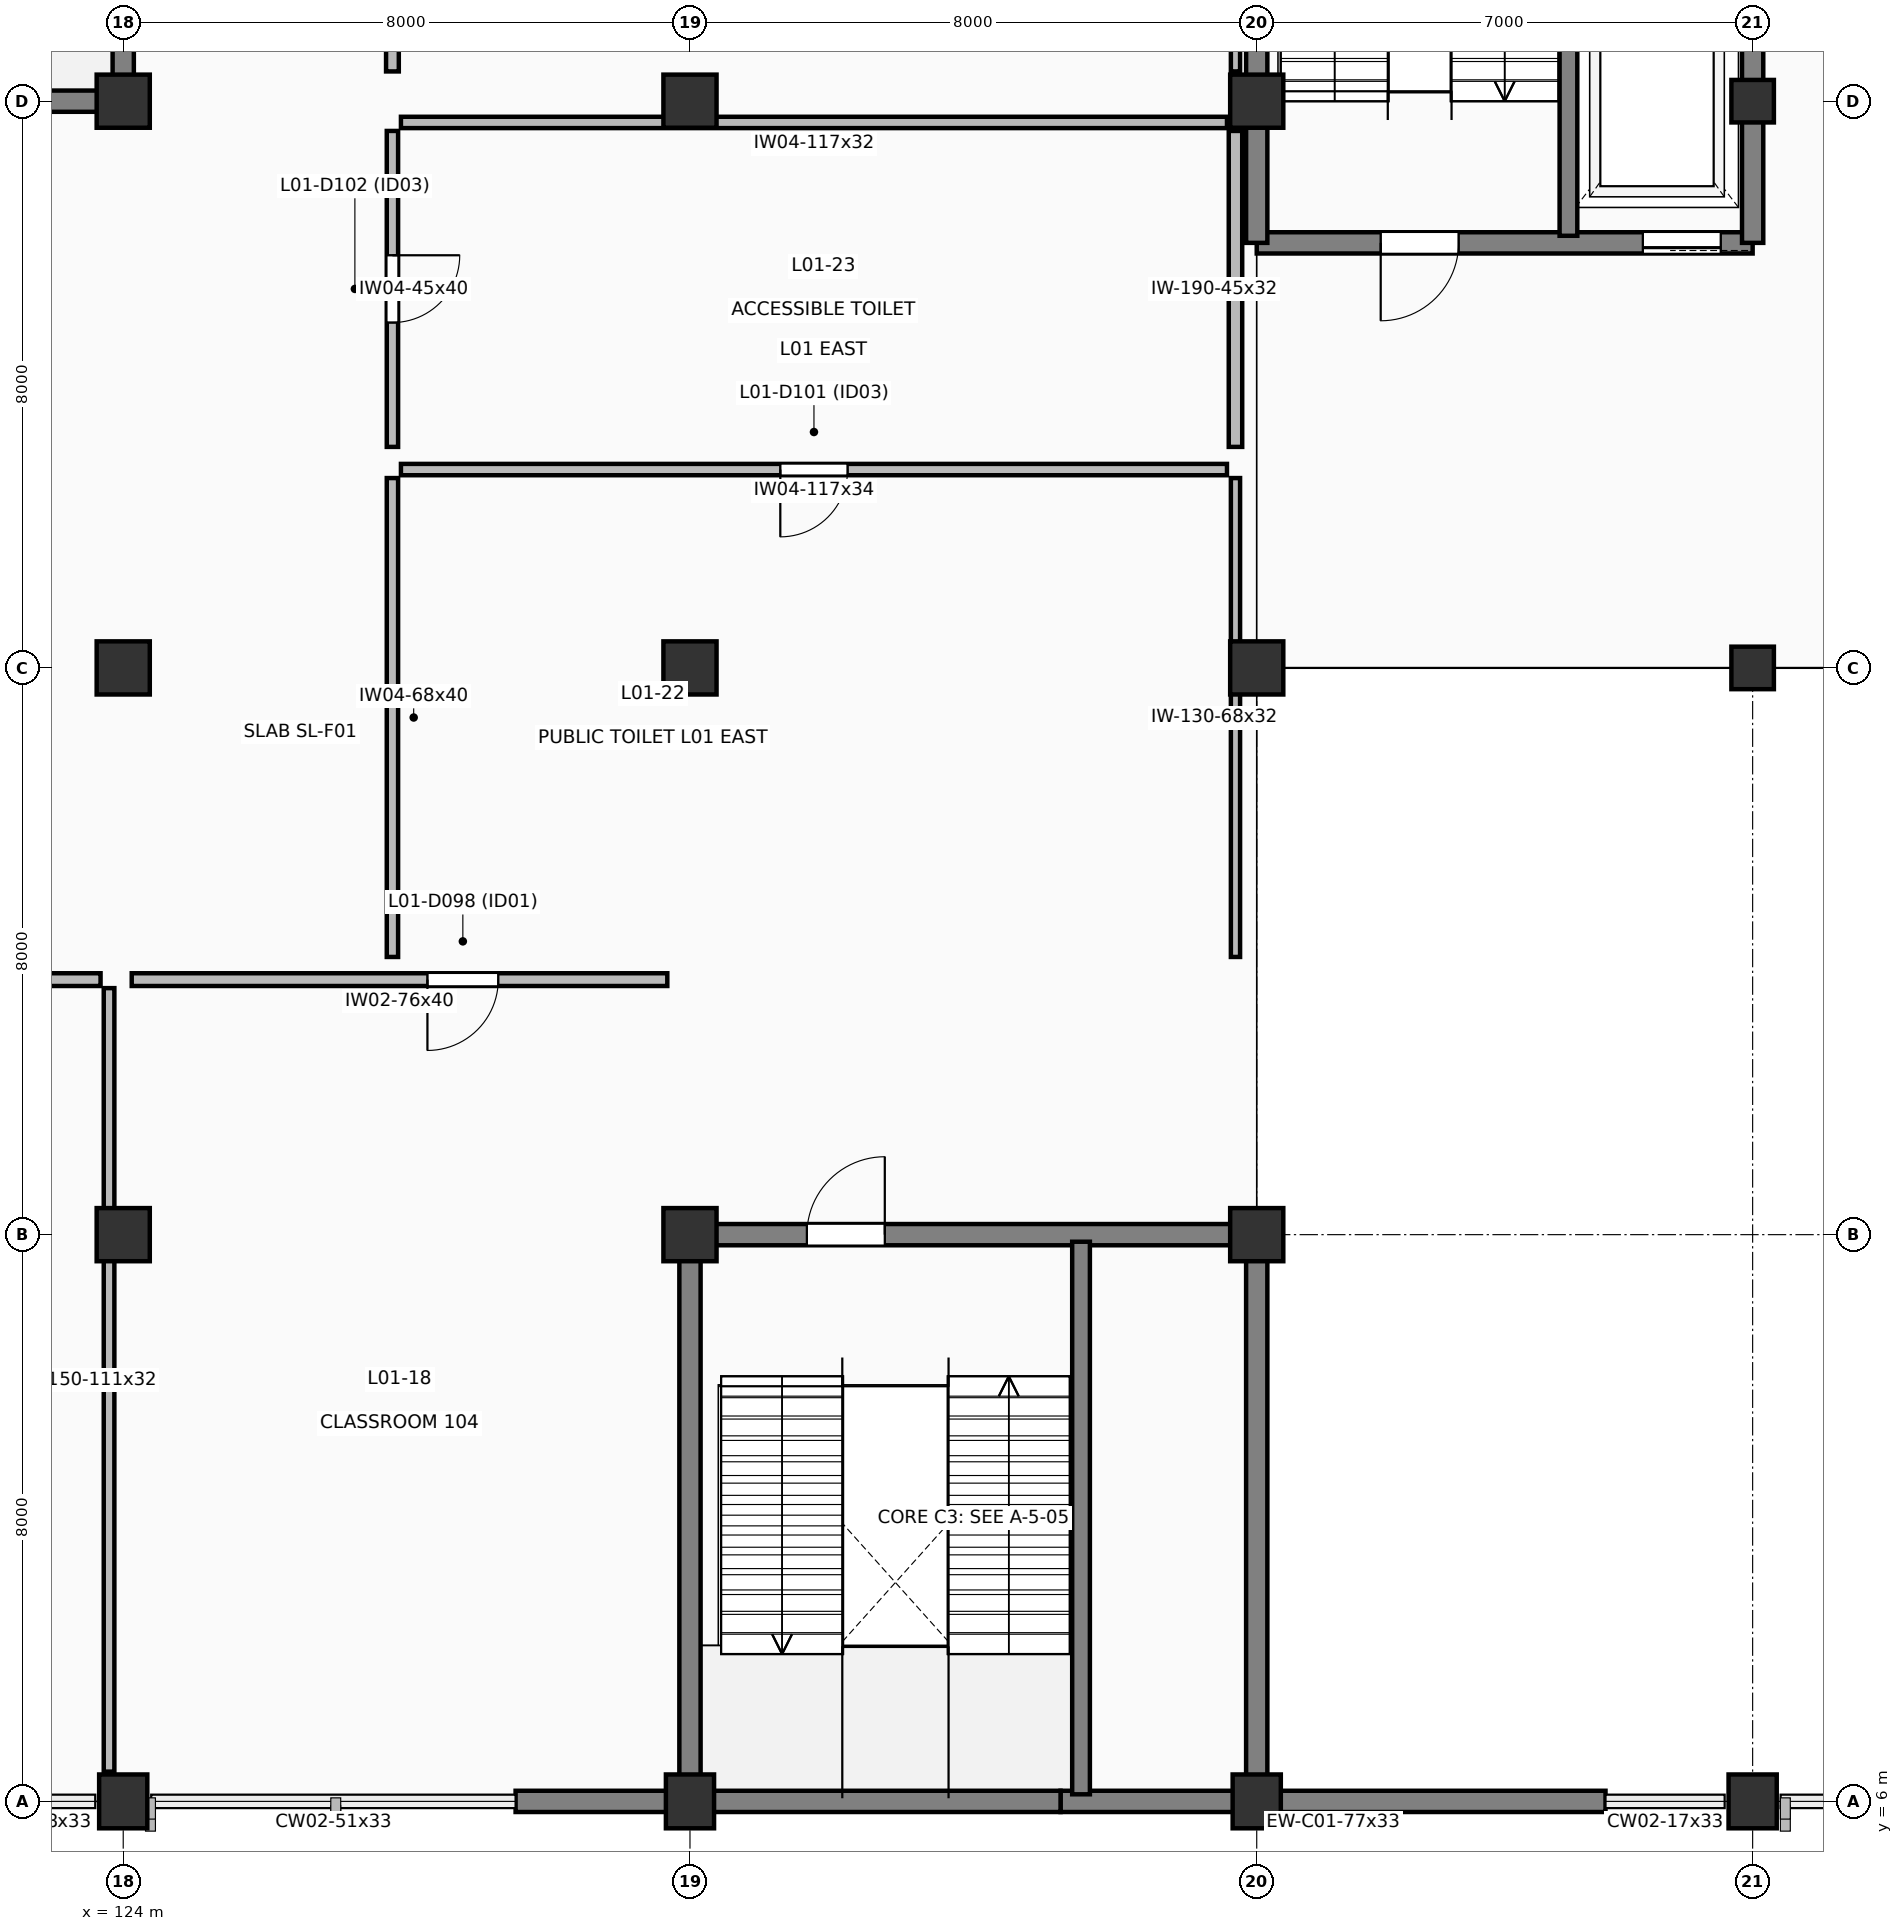
"""IFC4 building model, lengths in metres.
Left out: names, types, materials, properties, quantities, classifications, styles, units other than length and angle.
Written with IfcOpenShell. Run it as: python <this file> out.ifc"""

import sys

from ifc_helpers import new_model, si_unit, direction, frame, frame_2d, origin, origin_2d, place, context, subcontext, project, spatial, rectangle, extrude, element, fill, save


model = new_model("IFC4")
c1 = context("Model", 3, precision=1e-05, world=origin(), true_north=direction((0.0, 1.0)))
c2 = subcontext(c1, "Body", "Model", "MODEL_VIEW")
j1 = project(units=[si_unit("LENGTHUNIT", "METRE"), si_unit("PLANEANGLEUNIT", "RADIAN")], contexts=[c1])
p1 = place(None, origin())
s1 = spatial("IfcSite", under=j1, at=p1, CompositionType="ELEMENT")
p2 = place(p1, origin())
s2 = spatial("IfcBuilding", under=s1, at=p2, CompositionType="ELEMENT")
p3 = place(p2, frame((0.0, 0.0, 5.4)))
s3 = spatial("IfcBuildingStorey", under=s2, at=p3, CompositionType="ELEMENT", Elevation=5.4)
p4 = place(p3, frame((124.0, 6.0, 0.0), z_axis=(0.0, 0.0, 1.0), x_axis=(1.0, 0.0, 0.0)))
e1 = element("IfcColumn", 1, at=p4, inside=s3, PredefinedType="PILASTER", context=c2, shape_type="SweptSolid", body=[
    extrude(rectangle(XDim=0.68, YDim=0.76, at=origin_2d()), origin(), (0.0, 0.0, 1.0), 4.2),
])
for number, where, z_axis, x_axis in (
    (2, (124.0, 14.0, 0.0), (0.0, 0.0, 1.0), (1.0, 0.0, 0.0)),
    (3, (124.0, 22.0, 0.0), (0.0, 0.0, 1.0), (1.0, 0.0, 0.0)),
    (4, (124.0, 30.0, 0.0), (0.0, 0.0, 1.0), (1.0, 0.0, 0.0)),
):
    element("IfcColumn", number, at=place(p3, frame(where, z_axis=z_axis, x_axis=x_axis)), inside=s3, PredefinedType="COLUMN", context=c2, shape_type="SweptSolid", body=[
        extrude(rectangle(XDim=0.75, YDim=0.75, at=origin_2d()), origin(), (0.0, 0.0, 1.0), 4.2),
    ])
p5 = place(p3, frame((132.0, 6.0, 0.0), z_axis=(0.0, 0.0, 1.0), x_axis=(1.0, 0.0, 0.0)))
e5 = element("IfcColumn", 5, at=p5, inside=s3, PredefinedType="PILASTER", context=c2, shape_type="SweptSolid", body=[
    extrude(rectangle(XDim=0.68, YDim=0.76, at=origin_2d()), origin(), (0.0, 0.0, 1.0), 4.2),
])
for number, where, z_axis, x_axis in (
    (6, (132.0, 14.0, 0.0), (0.0, 0.0, 1.0), (1.0, 0.0, 0.0)),
    (7, (132.0, 22.0, 0.0), (0.0, 0.0, 1.0), (1.0, 0.0, 0.0)),
    (8, (132.0, 30.0, 0.0), (0.0, 0.0, 1.0), (1.0, 0.0, 0.0)),
):
    element("IfcColumn", number, at=place(p3, frame(where, z_axis=z_axis, x_axis=x_axis)), inside=s3, PredefinedType="COLUMN", context=c2, shape_type="SweptSolid", body=[
        extrude(rectangle(XDim=0.75, YDim=0.75, at=origin_2d()), origin(), (0.0, 0.0, 1.0), 4.2),
    ])
p6 = place(p3, frame((140.0, 6.0, 0.0), z_axis=(0.0, 0.0, 1.0), x_axis=(1.0, 0.0, 0.0)))
e9 = element("IfcColumn", 9, at=p6, inside=s3, PredefinedType="PILASTER", context=c2, shape_type="SweptSolid", body=[
    extrude(rectangle(XDim=0.68, YDim=0.76, at=origin_2d()), origin(), (0.0, 0.0, 1.0), 4.2),
])
for number, where, z_axis, x_axis in (
    (10, (140.0, 14.0, 0.0), (0.0, 0.0, 1.0), (1.0, 0.0, 0.0)),
    (11, (140.0, 22.0, 0.0), (0.0, 0.0, 1.0), (1.0, 0.0, 0.0)),
    (12, (140.0, 30.0, 0.0), (0.0, 0.0, 1.0), (1.0, 0.0, 0.0)),
):
    element("IfcColumn", number, at=place(p3, frame(where, z_axis=z_axis, x_axis=x_axis)), inside=s3, PredefinedType="COLUMN", context=c2, shape_type="SweptSolid", body=[
        extrude(rectangle(XDim=0.75, YDim=0.75, at=origin_2d()), origin(), (0.0, 0.0, 1.0), 4.2),
    ])
p7 = place(p3, frame((147.0, 6.0, 0.0), z_axis=(0.0, 0.0, 1.0), x_axis=(1.0, 0.0, 0.0)))
e13 = element("IfcColumn", 13, at=p7, inside=s3, PredefinedType="PILASTER", context=c2, shape_type="SweptSolid", body=[
    extrude(rectangle(XDim=0.68, YDim=0.76, at=origin_2d()), origin(), (0.0, 0.0, 1.0), 4.2),
])
for number, where, z_axis, x_axis in (
    (14, (147.0, 22.0, 0.0), (0.0, 0.0, 1.0), (1.0, 0.0, 0.0)),
    (15, (147.0, 30.0, 0.0), (0.0, 0.0, 1.0), (1.0, 0.0, 0.0)),
):
    element("IfcColumn", number, at=place(p3, frame(where, z_axis=z_axis, x_axis=x_axis)), inside=s3, PredefinedType="COLUMN", context=c2, shape_type="SweptSolid", body=[
        extrude(rectangle(XDim=0.6, YDim=0.6, at=origin_2d()), origin(), (0.0, 0.0, 1.0), 4.2),
    ])
p8 = place(p3, frame((144.923, 6.0, 0.0), z_axis=(0.0, 0.0, 1.0), x_axis=(-1.0, 0.0, 0.0)))
e16 = element("IfcWall", 16, at=p8, inside=s3, PredefinedType="SOLIDWALL", context=c2, shape_type="SweptSolid", body=[
    extrude(rectangle(XDim=7.692, YDim=0.3, at=frame_2d((3.846, 0.0))), origin(), (0.0, 0.0, 1.0), 4.2),
])
p9 = place(p3, frame((137.231, 6.0, 0.0), z_axis=(0.0, 0.0, 1.0), x_axis=(-1.0, 0.0, 0.0)))
e17 = element("IfcWall", 17, at=p9, inside=s3, PredefinedType="SOLIDWALL", context=c2, shape_type="SweptSolid", body=[
    extrude(rectangle(XDim=7.692, YDim=0.3, at=frame_2d((3.846, 0.0))), origin(), (0.0, 0.0, 1.0), 4.2),
])
p10 = place(p3, frame((132.0, 6.0, 0.0), z_axis=(0.0, 0.0, 1.0), x_axis=(0.0, 1.0, 0.0)))
e18 = element("IfcWall", 18, at=p10, inside=s3, PredefinedType="SHEAR", context=c2, shape_type="SweptSolid", body=[
    extrude(rectangle(XDim=8.0, YDim=0.3, at=frame_2d((4.0, 0.0))), origin(), (0.0, 0.0, 1.0), 4.2),
])
p11 = place(p3, frame((132.0, 14.0, 0.0), z_axis=(0.0, 0.0, 1.0), x_axis=(1.0, 0.0, 0.0)))
e19 = element("IfcWall", 19, at=p11, inside=s3, PredefinedType="SHEAR", context=c2, shape_type="SweptSolid", body=[
    extrude(rectangle(XDim=8.0, YDim=0.3, at=frame_2d((4.0, 0.0))), origin(), (0.0, 0.0, 1.0), 4.2),
])
p12 = place(p11, frame((1.65, 0.0, 0.0)))
e20 = element("IfcOpeningElement", 20, at=p12, cuts=e19, PredefinedType="OPENING", context=c2, shape_type="SweptSolid", body=[
    extrude(rectangle(XDim=1.1, YDim=2.2, at=frame_2d((0.55, 1.1))), frame((0.0, 0.16, 0.0), z_axis=(0.0, -1.0, 0.0), x_axis=(1.0, 0.0, 0.0)), (0.0, 0.0, 1.0), 0.32),
])
p13 = place(p3, frame((140.0, 14.0, 0.0), z_axis=(0.0, 0.0, 1.0), x_axis=(0.0, -1.0, 0.0)))
e21 = element("IfcWall", 21, at=p13, inside=s3, PredefinedType="SHEAR", context=c2, shape_type="SweptSolid", body=[
    extrude(rectangle(XDim=8.0, YDim=0.3, at=frame_2d((4.0, 0.0))), origin(), (0.0, 0.0, 1.0), 4.2),
])
p14 = place(p3, frame((137.52, 6.1, 0.0), z_axis=(0.0, 0.0, 1.0), x_axis=(0.0, 1.0, 0.0)))
e22 = element("IfcWall", 22, at=p14, inside=s3, PredefinedType="SHEAR", context=c2, shape_type="SweptSolid", body=[
    extrude(rectangle(XDim=7.8, YDim=0.25, at=frame_2d((3.9, 0.0))), origin(), (0.0, 0.0, 1.0), 4.2),
])
p15 = place(p3, frame((124.0, 30.0, 0.0), z_axis=(0.0, 0.0, 1.0), x_axis=(-1.0, 0.0, 0.0)))
e23 = element("IfcWall", 23, at=p15, inside=s3, PredefinedType="SHEAR", context=c2, shape_type="SweptSolid", body=[
    extrude(rectangle(XDim=8.0, YDim=0.3, at=frame_2d((4.0, 0.0))), origin(), (0.0, 0.0, 1.0), 4.2),
])
p16 = place(p15, frame((6.3, 0.0, 0.0)))
e24 = element("IfcOpeningElement", 24, at=p16, cuts=e23, PredefinedType="OPENING", context=c2, shape_type="SweptSolid", body=[
    extrude(rectangle(XDim=1.1, YDim=2.2, at=frame_2d((0.55, 1.1))), frame((0.0, 0.16, 0.0), z_axis=(0.0, -1.0, 0.0), x_axis=(1.0, 0.0, 0.0)), (0.0, 0.0, 1.0), 0.32),
])
p17 = place(p3, frame((124.0, 36.0, 0.0), z_axis=(0.0, 0.0, 1.0), x_axis=(0.0, -1.0, 0.0)))
e25 = element("IfcWall", 25, at=p17, inside=s3, PredefinedType="SHEAR", context=c2, shape_type="SweptSolid", body=[
    extrude(rectangle(XDim=6.0, YDim=0.3, at=frame_2d((3.0, 0.0))), origin(), (0.0, 0.0, 1.0), 4.2),
])
p18 = place(p3, frame((147.0, 28.0, 0.0), z_axis=(0.0, 0.0, 1.0), x_axis=(-1.0, 0.0, 0.0)))
e26 = element("IfcWall", 26, at=p18, inside=s3, PredefinedType="SHEAR", context=c2, shape_type="SweptSolid", body=[
    extrude(rectangle(XDim=7.0, YDim=0.3, at=frame_2d((3.5, 0.0))), origin(), (0.0, 0.0, 1.0), 4.2),
])
p19 = place(p18, frame((4.15, 0.0, 0.0)))
e27 = element("IfcOpeningElement", 27, at=p19, cuts=e26, PredefinedType="OPENING", context=c2, shape_type="SweptSolid", body=[
    extrude(rectangle(XDim=1.1, YDim=2.2, at=frame_2d((0.55, 1.1))), frame((0.0, 0.16, 0.0), z_axis=(0.0, -1.0, 0.0), x_axis=(1.0, 0.0, 0.0)), (0.0, 0.0, 1.0), 0.32),
])
p20 = place(p18, frame((0.45, 0.0, 0.0)))
e28 = element("IfcOpeningElement", 28, at=p20, cuts=e26, PredefinedType="OPENING", context=c2, shape_type="SweptSolid", body=[
    extrude(rectangle(XDim=1.1, YDim=2.2, at=frame_2d((0.55, 1.1))), frame((0.0, 0.16, 0.0), z_axis=(0.0, -1.0, 0.0), x_axis=(1.0, 0.0, 0.0)), (0.0, 0.0, 1.0), 0.32),
])
for number, where, z_axis, x_axis in (
    (29, (140.0, 28.0, 0.0), (0.0, 0.0, 1.0), (0.0, 1.0, 0.0)),
    (30, (147.0, 36.0, 0.0), (0.0, 0.0, 1.0), (0.0, -1.0, 0.0)),
):
    element("IfcWall", number, at=place(p3, frame(where, z_axis=z_axis, x_axis=x_axis)), inside=s3, PredefinedType="SHEAR", context=c2, shape_type="SweptSolid", body=[
        extrude(rectangle(XDim=8.0, YDim=0.3, at=frame_2d((4.0, 0.0))), origin(), (0.0, 0.0, 1.0), 4.2),
    ])
p21 = place(p3, frame((144.4, 28.1, 0.0), z_axis=(0.0, 0.0, 1.0), x_axis=(0.0, 1.0, 0.0)))
e31 = element("IfcWall", 31, at=p21, inside=s3, PredefinedType="SHEAR", context=c2, shape_type="SweptSolid", body=[
    extrude(rectangle(XDim=7.8, YDim=0.25, at=frame_2d((3.9, 0.0))), origin(), (0.0, 0.0, 1.0), 4.2),
])
p22 = place(p3, frame((123.68, 17.6, 0.0), z_axis=(0.0, 0.0, 1.0), x_axis=(-1.0, 0.0, 0.0)))
e32 = element("IfcWall", 32, at=p22, inside=s3, PredefinedType="PARTITIONING", context=c2, shape_type="SweptSolid", body=[
    extrude(rectangle(XDim=15.36, YDim=0.18, at=frame_2d((7.68, 0.0))), origin(), (0.0, 0.0, 1.0), 3.98),
])
p23 = place(p22, frame((7.18, 0.0, 0.0)))
e33 = element("IfcOpeningElement", 33, at=p23, cuts=e32, PredefinedType="OPENING", context=c2, shape_type="SweptSolid", body=[
    extrude(rectangle(XDim=1.0, YDim=2.15, at=frame_2d((0.5, 1.075))), frame((0.0, 0.1, 0.0), z_axis=(0.0, -1.0, 0.0), x_axis=(1.0, 0.0, 0.0)), (0.0, 0.0, 1.0), 0.2),
])
p24 = place(p3, frame((123.8, 6.42, 0.0), z_axis=(0.0, 0.0, 1.0), x_axis=(0.0, 1.0, 0.0)))
e34 = element("IfcWall", 34, at=p24, inside=s3, PredefinedType="PARTITIONING", context=c2, shape_type="SweptSolid", body=[
    extrude(rectangle(XDim=11.06, YDim=0.15, at=frame_2d((5.53, 0.0))), origin(), (0.0, 0.0, 1.0), 3.225),
])
p25 = place(p3, frame((131.68, 17.6, 0.0), z_axis=(0.0, 0.0, 1.0), x_axis=(-1.0, 0.0, 0.0)))
e35 = element("IfcWall", 35, at=p25, inside=s3, PredefinedType="PARTITIONING", context=c2, shape_type="SweptSolid", body=[
    extrude(rectangle(XDim=7.56, YDim=0.18, at=frame_2d((3.78, 0.0))), origin(), (0.0, 0.0, 1.0), 3.98),
])
p26 = place(p25, frame((2.386, 0.0, 0.0)))
e36 = element("IfcOpeningElement", 36, at=p26, cuts=e35, PredefinedType="OPENING", context=c2, shape_type="SweptSolid", body=[
    extrude(rectangle(XDim=1.0, YDim=2.15, at=frame_2d((0.5, 1.075))), frame((0.0, 0.1, 0.0), z_axis=(0.0, -1.0, 0.0), x_axis=(1.0, 0.0, 0.0)), (0.0, 0.0, 1.0), 0.2),
])
p27 = place(p3, frame((139.58, 24.8, 0.0), z_axis=(0.0, 0.0, 1.0), x_axis=(-1.0, 0.0, 0.0)))
e37 = element("IfcWall", 37, at=p27, inside=s3, PredefinedType="PLUMBINGWALL", context=c2, shape_type="SweptSolid", body=[
    extrude(rectangle(XDim=11.66, YDim=0.16, at=frame_2d((5.83, 0.0))), origin(), (0.0, 0.0, 1.0), 3.385),
])
p28 = place(p27, frame((5.355, 0.0, 0.0)))
e38 = element("IfcOpeningElement", 38, at=p28, cuts=e37, PredefinedType="OPENING", context=c2, shape_type="SweptSolid", body=[
    extrude(rectangle(XDim=0.95, YDim=2.15, at=frame_2d((0.475, 1.075))), frame((0.0, 0.09, 0.0), z_axis=(0.0, -1.0, 0.0), x_axis=(1.0, 0.0, 0.0)), (0.0, 0.0, 1.0), 0.18),
])
p29 = place(p3, frame((127.8, 24.68, 0.0), z_axis=(0.0, 0.0, 1.0), x_axis=(0.0, -1.0, 0.0)))
e39 = element("IfcWall", 39, at=p29, inside=s3, PredefinedType="PLUMBINGWALL", context=c2, shape_type="SweptSolid", body=[
    extrude(rectangle(XDim=6.76, YDim=0.16, at=frame_2d((3.38, 0.0))), origin(), (0.0, 0.0, 1.0), 3.98),
])
p30 = place(p3, frame((139.7, 17.92, 0.0), z_axis=(0.0, 0.0, 1.0), x_axis=(0.0, 1.0, 0.0)))
e40 = element("IfcWall", 40, at=p30, inside=s3, PredefinedType="PARTITIONING", context=c2, shape_type="SweptSolid", body=[
    extrude(rectangle(XDim=6.76, YDim=0.13, at=frame_2d((3.38, 0.0))), origin(), (0.0, 0.0, 1.0), 3.225),
])
p31 = place(p3, frame((139.58, 29.7, 0.0), z_axis=(0.0, 0.0, 1.0), x_axis=(-1.0, 0.0, 0.0)))
e41 = element("IfcWall", 41, at=p31, inside=s3, PredefinedType="PLUMBINGWALL", context=c2, shape_type="SweptSolid", body=[
    extrude(rectangle(XDim=11.66, YDim=0.16, at=frame_2d((5.83, 0.0))), origin(), (0.0, 0.0, 1.0), 3.165),
])
p32 = place(p3, frame((127.8, 29.58, 0.0), z_axis=(0.0, 0.0, 1.0), x_axis=(0.0, -1.0, 0.0)))
e42 = element("IfcWall", 42, at=p32, inside=s3, PredefinedType="PLUMBINGWALL", context=c2, shape_type="SweptSolid", body=[
    extrude(rectangle(XDim=4.46, YDim=0.16, at=frame_2d((2.23, 0.0))), origin(), (0.0, 0.0, 1.0), 3.98),
])
p33 = place(p32, frame((1.755, 0.0, 0.0)))
e43 = element("IfcOpeningElement", 43, at=p33, cuts=e42, PredefinedType="OPENING", context=c2, shape_type="SweptSolid", body=[
    extrude(rectangle(XDim=0.95, YDim=2.15, at=frame_2d((0.475, 1.075))), frame((0.0, 0.09, 0.0), z_axis=(0.0, -1.0, 0.0), x_axis=(1.0, 0.0, 0.0)), (0.0, 0.0, 1.0), 0.18),
])
p34 = place(p3, frame((139.7, 25.12, 0.0), z_axis=(0.0, 0.0, 1.0), x_axis=(0.0, 1.0, 0.0)))
e44 = element("IfcWall", 44, at=p34, inside=s3, PredefinedType="PARTITIONING", context=c2, shape_type="SweptSolid", body=[
    extrude(rectangle(XDim=4.46, YDim=0.19, at=frame_2d((2.23, 0.0))), origin(), (0.0, 0.0, 1.0), 3.225),
])
p35 = place(p3, frame((127.8, 44.88, 0.0), z_axis=(0.0, 0.0, 1.0), x_axis=(0.0, -1.0, 0.0)))
e45 = element("IfcWall", 45, at=p35, inside=s3, PredefinedType="PARTITIONING", context=c2, shape_type="SweptSolid", body=[
    extrude(rectangle(XDim=14.46, YDim=0.18, at=frame_2d((7.23, 0.0))), origin(), (0.0, 0.0, 1.0), 3.98),
])
p36 = place(p3, frame((139.7, 30.42, 0.0), z_axis=(0.0, 0.0, 1.0), x_axis=(0.0, 1.0, 0.0)))
e46 = element("IfcWall", 46, at=p36, inside=s3, PredefinedType="PARTITIONING", context=c2, shape_type="SweptSolid", body=[
    extrude(rectangle(XDim=14.46, YDim=0.13, at=frame_2d((7.23, 0.0))), origin(), (0.0, 0.0, 1.0), 3.245),
])
p37 = place(p12, origin())
e47 = element("IfcDoor", 47, at=p37, inside=s3, OperationType="SINGLE_SWING_RIGHT", PredefinedType="DOOR", context=c2, shape_type="SweptSolid", body=[
    extrude(rectangle(XDim=1.1, YDim=2.2, at=frame_2d((0.55, 1.1))), frame((0.0, 0.025, 0.0), z_axis=(0.0, -1.0, 0.0), x_axis=(1.0, 0.0, 0.0)), (0.0, 0.0, 1.0), 0.05),
])
fill(e20, e47)
p38 = place(p19, origin())
e48 = element("IfcDoor", 48, at=p38, inside=s3, OperationType="SINGLE_SWING_RIGHT", PredefinedType="DOOR", context=c2, shape_type="SweptSolid", body=[
    extrude(rectangle(XDim=1.1, YDim=2.2, at=frame_2d((0.55, 1.1))), frame((0.0, 0.025, 0.0), z_axis=(0.0, -1.0, 0.0), x_axis=(1.0, 0.0, 0.0)), (0.0, 0.0, 1.0), 0.05),
])
fill(e27, e48)
p39 = place(p20, origin())
e49 = element("IfcDoor", 49, at=p39, inside=s3, OperationType="SLIDING_TO_LEFT", PredefinedType="DOOR", context=c2, shape_type="SweptSolid", body=[
    extrude(rectangle(XDim=1.1, YDim=2.2, at=frame_2d((0.55, 1.1))), frame((0.0, 0.025, 0.0), z_axis=(0.0, -1.0, 0.0), x_axis=(1.0, 0.0, 0.0)), (0.0, 0.0, 1.0), 0.05),
])
fill(e28, e49)
p40 = place(p26, origin())
e50 = element("IfcDoor", 50, at=p40, inside=s3, OperationType="SINGLE_SWING_RIGHT", PredefinedType="DOOR", context=c2, shape_type="SweptSolid", body=[
    extrude(rectangle(XDim=1.0, YDim=2.15, at=frame_2d((0.5, 1.075))), frame((0.0, 0.025, 0.0), z_axis=(0.0, -1.0, 0.0), x_axis=(1.0, 0.0, 0.0)), (0.0, 0.0, 1.0), 0.05),
])
fill(e36, e50)
p41 = place(p28, origin())
e51 = element("IfcDoor", 51, at=p41, inside=s3, OperationType="SINGLE_SWING_RIGHT", PredefinedType="DOOR", context=c2, shape_type="SweptSolid", body=[
    extrude(rectangle(XDim=0.95, YDim=2.15, at=frame_2d((0.475, 1.075))), frame((0.0, 0.025, 0.0), z_axis=(0.0, -1.0, 0.0), x_axis=(1.0, 0.0, 0.0)), (0.0, 0.0, 1.0), 0.05),
])
fill(e38, e51)
p42 = place(p33, origin())
e52 = element("IfcDoor", 52, at=p42, inside=s3, OperationType="SINGLE_SWING_LEFT", PredefinedType="DOOR", context=c2, shape_type="SweptSolid", body=[
    extrude(rectangle(XDim=0.95, YDim=2.15, at=frame_2d((0.475, 1.075))), frame((0.0, 0.025, 0.0), z_axis=(0.0, -1.0, 0.0), x_axis=(1.0, 0.0, 0.0)), (0.0, 0.0, 1.0), 0.05),
])
fill(e43, e52)
save(model, sys.argv[1])
